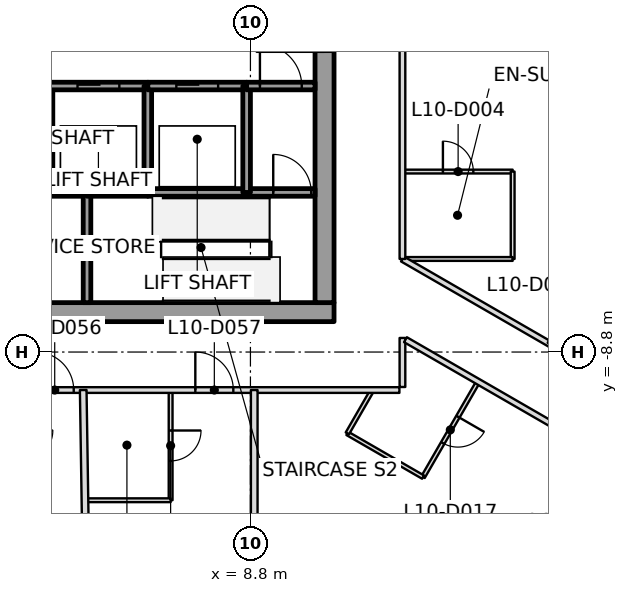
"""IFC4 building model, lengths in metres.
Left out: names, types, materials, properties, quantities, classifications, styles, units other than length and angle.
Written with IfcOpenShell. Run it as: python <this file> out.ifc"""

import sys

from ifc_helpers import new_model, si_unit, direction, frame, frame_2d, origin, place, context, subcontext, project, spatial, rectangle, extrude, element, fill, save


model = new_model("IFC4")
c1 = context("Model", 3, precision=1e-05, world=origin(), true_north=direction((0.0, 1.0)))
c2 = subcontext(c1, "Body", "Model", "MODEL_VIEW")
j1 = project(units=[si_unit("LENGTHUNIT", "METRE"), si_unit("PLANEANGLEUNIT", "RADIAN")], contexts=[c1])
p1 = place(None, origin())
s1 = spatial("IfcSite", under=j1, at=p1, CompositionType="ELEMENT")
p2 = place(p1, origin())
s2 = spatial("IfcBuilding", under=s1, at=p2, CompositionType="ELEMENT")
p3 = place(p2, frame((0.0, 0.0, 59.1)))
s3 = spatial("IfcBuildingStorey", under=s2, at=p3, CompositionType="ELEMENT", Elevation=59.1)
p4 = place(p3, frame((-11.0, -7.75, 0.0), z_axis=(0.0, 0.0, 1.0), x_axis=(1.0, 0.0, 0.0)))
e1 = element("IfcWall", 1, at=p4, inside=s3, PredefinedType="SHEAR", context=c2, shape_type="SweptSolid", body=[
    extrude(rectangle(XDim=22.0, YDim=0.5, at=frame_2d((11.0, 0.0))), origin(), (0.0, 0.0, 1.0), 3.7),
])
p5 = place(p4, frame((10.45, 0.0, 0.0)))
e2 = element("IfcOpeningElement", 2, at=p5, cuts=e1, PredefinedType="OPENING", context=c2, shape_type="SweptSolid", body=[
    extrude(rectangle(XDim=1.1, YDim=2.1, at=frame_2d((0.55, 1.05))), frame((0.0, 0.25, 0.0), z_axis=(0.0, -1.0, 0.0), x_axis=(1.0, 0.0, 0.0)), (0.0, 0.0, 1.0), 0.5),
])
p6 = place(p3, frame((10.75, -7.5, 0.0), z_axis=(0.0, 0.0, 1.0), x_axis=(0.0, 1.0, 0.0)))
e3 = element("IfcWall", 3, at=p6, inside=s3, PredefinedType="SHEAR", context=c2, shape_type="SweptSolid", body=[
    extrude(rectangle(XDim=15.0, YDim=0.5, at=frame_2d((7.5, 0.0))), origin(), (0.0, 0.0, 1.0), 3.7),
])
p7 = place(p6, frame((6.6, 0.0, 0.0)))
e4 = element("IfcOpeningElement", 4, at=p7, cuts=e3, PredefinedType="OPENING", context=c2, shape_type="SweptSolid", body=[
    extrude(rectangle(XDim=1.8, YDim=2.1, at=frame_2d((0.9, 1.05))), frame((0.0, 0.25, 0.0), z_axis=(0.0, -1.0, 0.0), x_axis=(1.0, 0.0, 0.0)), (0.0, 0.0, 1.0), 0.5),
])
p8 = place(p3, frame((4.5, -4.6, 0.0), z_axis=(0.0, 0.0, 1.0), x_axis=(-1.0, 0.0, 0.0)))
e5 = element("IfcWall", 5, at=p8, inside=s3, PredefinedType="SOLIDWALL", context=c2, shape_type="SweptSolid", body=[
    extrude(rectangle(XDim=1.0, YDim=0.2, at=frame_2d((0.5, 0.0))), origin(), (0.0, 0.0, 1.0), 3.55),
])
p9 = place(p3, frame((3.5, -1.8, 0.0), z_axis=(0.0, 0.0, 1.0), x_axis=(1.0, 0.0, 0.0)))
e6 = element("IfcWall", 6, at=p9, inside=s3, PredefinedType="SOLIDWALL", context=c2, shape_type="SweptSolid", body=[
    extrude(rectangle(XDim=2.6, YDim=0.2, at=frame_2d((1.3, 0.0))), origin(), (0.0, 0.0, 1.0), 3.55),
])
p10 = place(p9, frame((0.75, 0.0, 0.0)))
e7 = element("IfcOpeningElement", 7, at=p10, cuts=e6, PredefinedType="OPENING", context=c2, shape_type="SweptSolid", body=[
    extrude(rectangle(XDim=1.1, YDim=2.1, at=frame_2d((0.55, 1.05))), frame((0.0, 0.1, 0.0), z_axis=(0.0, -1.0, 0.0), x_axis=(1.0, 0.0, 0.0)), (0.0, 0.0, 1.0), 0.2),
])
p11 = place(p3, frame((4.5, -7.5, 0.0), z_axis=(0.0, 0.0, 1.0), x_axis=(0.0, 1.0, 0.0)))
e8 = element("IfcWall", 8, at=p11, inside=s3, PredefinedType="SOLIDWALL", context=c2, shape_type="SweptSolid", body=[
    extrude(rectangle(XDim=2.9, YDim=0.2, at=frame_2d((1.45, 0.0))), origin(), (0.0, 0.0, 1.0), 3.55),
])
p12 = place(p3, frame((4.5, -4.6, 0.0), z_axis=(0.0, 0.0, 1.0), x_axis=(1.0, 0.0, 0.0)))
e9 = element("IfcWall", 9, at=p12, inside=s3, PredefinedType="SOLIDWALL", context=c2, shape_type="SweptSolid", body=[
    extrude(rectangle(XDim=1.6, YDim=0.2, at=frame_2d((0.8, 0.0))), origin(), (0.0, 0.0, 1.0), 3.55),
])
p13 = place(p3, frame((6.1, -4.6, 0.0), z_axis=(0.0, 0.0, 1.0), x_axis=(1.0, 0.0, 0.0)))
e10 = element("IfcWall", 10, at=p13, inside=s3, PredefinedType="SOLIDWALL", context=c2, shape_type="SweptSolid", body=[
    extrude(rectangle(XDim=2.6, YDim=0.2, at=frame_2d((1.3, 0.0))), origin(), (0.0, 0.0, 1.0), 3.55),
])
p14 = place(p3, frame((6.1, -4.6, 0.0), z_axis=(0.0, 0.0, 1.0), x_axis=(0.0, 1.0, 0.0)))
e11 = element("IfcWall", 11, at=p14, inside=s3, PredefinedType="SOLIDWALL", context=c2, shape_type="SweptSolid", body=[
    extrude(rectangle(XDim=2.8, YDim=0.2, at=frame_2d((1.4, 0.0))), origin(), (0.0, 0.0, 1.0), 3.55),
])
p15 = place(p3, frame((6.1, -1.8, 0.0), z_axis=(0.0, 0.0, 1.0), x_axis=(1.0, 0.0, 0.0)))
e12 = element("IfcWall", 12, at=p15, inside=s3, PredefinedType="SOLIDWALL", context=c2, shape_type="SweptSolid", body=[
    extrude(rectangle(XDim=2.6, YDim=0.2, at=frame_2d((1.3, 0.0))), origin(), (0.0, 0.0, 1.0), 3.55),
])
p16 = place(p15, frame((0.75, 0.0, 0.0)))
e13 = element("IfcOpeningElement", 13, at=p16, cuts=e12, PredefinedType="OPENING", context=c2, shape_type="SweptSolid", body=[
    extrude(rectangle(XDim=1.1, YDim=2.1, at=frame_2d((0.55, 1.05))), frame((0.0, 0.1, 0.0), z_axis=(0.0, -1.0, 0.0), x_axis=(1.0, 0.0, 0.0)), (0.0, 0.0, 1.0), 0.2),
])
p17 = place(p3, frame((8.7, -4.6, 0.0), z_axis=(0.0, 0.0, 1.0), x_axis=(1.0, 0.0, 0.0)))
e14 = element("IfcWall", 14, at=p17, inside=s3, PredefinedType="SOLIDWALL", context=c2, shape_type="SweptSolid", body=[
    extrude(rectangle(XDim=1.8, YDim=0.2, at=frame_2d((0.9, 0.0))), origin(), (0.0, 0.0, 1.0), 3.55),
])
p18 = place(p17, frame((0.7, 0.0, 0.0)))
e15 = element("IfcOpeningElement", 15, at=p18, cuts=e14, PredefinedType="OPENING", context=c2, shape_type="SweptSolid", body=[
    extrude(rectangle(XDim=1.0, YDim=2.1, at=frame_2d((0.5, 1.05))), frame((0.0, 0.1, 0.0), z_axis=(0.0, -1.0, 0.0), x_axis=(1.0, 0.0, 0.0)), (0.0, 0.0, 1.0), 0.2),
])
p19 = place(p3, frame((8.7, -1.8, 0.0), z_axis=(0.0, 0.0, 1.0), x_axis=(0.0, -1.0, 0.0)))
e16 = element("IfcWall", 16, at=p19, inside=s3, PredefinedType="SOLIDWALL", context=c2, shape_type="SweptSolid", body=[
    extrude(rectangle(XDim=2.8, YDim=0.2, at=frame_2d((1.4, 0.0))), origin(), (0.0, 0.0, 1.0), 3.55),
])
p20 = place(p3, frame((8.7, -1.8, 0.0), z_axis=(0.0, 0.0, 1.0), x_axis=(1.0, 0.0, 0.0)))
e17 = element("IfcWall", 17, at=p20, inside=s3, PredefinedType="SOLIDWALL", context=c2, shape_type="SweptSolid", body=[
    extrude(rectangle(XDim=1.8, YDim=0.2, at=frame_2d((0.9, 0.0))), origin(), (0.0, 0.0, 1.0), 3.55),
])
p21 = place(p20, frame((0.35, 0.0, 0.0)))
e18 = element("IfcOpeningElement", 18, at=p21, cuts=e17, PredefinedType="OPENING", context=c2, shape_type="SweptSolid", body=[
    extrude(rectangle(XDim=1.1, YDim=2.1, at=frame_2d((0.55, 1.05))), frame((0.0, 0.1, 0.0), z_axis=(0.0, -1.0, 0.0), x_axis=(1.0, 0.0, 0.0)), (0.0, 0.0, 1.0), 0.2),
])
p22 = place(p3, frame((4.4, -9.8, 0.0), z_axis=(0.0, 0.0, 1.0), x_axis=(0.015658866924, -0.999877392427, 0.0)))
e19 = element("IfcWall", 19, at=p22, inside=s3, PredefinedType="PARTITIONING", context=c2, shape_type="SweptSolid", body=[
    extrude(rectangle(XDim=16.417, YDim=0.175, at=frame_2d((8.209, 0.0))), origin(), (0.0, 0.0, 1.0), 2.934),
])
p23 = place(p3, frame((8.9, -9.8, 0.0), z_axis=(0.0, 0.0, 1.0), x_axis=(0.0, -1.0, 0.0)))
e20 = element("IfcWall", 20, at=p23, inside=s3, PredefinedType="PARTITIONING", context=c2, shape_type="SweptSolid", body=[
    extrude(rectangle(XDim=16.409, YDim=0.175, at=frame_2d((8.205, 0.0))), origin(), (0.0, 0.0, 1.0), 3.15),
])
p24 = place(p3, frame((19.87, -12.511, 0.0), z_axis=(0.0, 0.0, 1.0), x_axis=(-0.500001430823, -0.866024577697, 0.0)))
e21 = element("IfcWall", 21, at=p24, inside=s3, PredefinedType="PARTITIONING", context=c2, shape_type="SweptSolid", body=[
    extrude(rectangle(XDim=14.141, YDim=0.175, at=frame_2d((7.07, 0.0))), origin(), (0.0, 0.0, 1.0), 2.797),
])
p25 = place(p3, frame((24.011, 3.761, 0.0), z_axis=(0.0, 0.0, 1.0), x_axis=(-0.509232005263, -0.860629284196, 0.0)))
e22 = element("IfcWall", 22, at=p25, inside=s3, PredefinedType="PARTITIONING", context=c2, shape_type="SweptSolid", body=[
    extrude(rectangle(XDim=14.364, YDim=0.175, at=frame_2d((7.182, 0.0))), origin(), (0.0, 0.0, 1.0), 2.947),
])
p26 = place(p3, frame((-12.72, -9.8, 0.0), z_axis=(0.0, 0.0, 1.0), x_axis=(1.0, 0.0, 0.0)))
e23 = element("IfcWall", 23, at=p26, inside=s3, PredefinedType="PARTITIONING", context=c2, shape_type="SweptSolid", body=[
    extrude(rectangle(XDim=25.44, YDim=0.15, at=frame_2d((12.72, 0.0))), origin(), (0.0, 0.0, 1.0), 2.947),
])
p27 = place(p26, frame((3.07, 0.0, 0.0)))
e24 = element("IfcOpeningElement", 24, at=p27, cuts=e23, PredefinedType="OPENING", context=c2, shape_type="SweptSolid", body=[
    extrude(rectangle(XDim=1.0, YDim=2.1, at=frame_2d((0.5, 1.05))), frame((0.0, 0.075, 0.0), z_axis=(0.0, -1.0, 0.0), x_axis=(1.0, 0.0, 0.0)), (0.0, 0.0, 1.0), 0.15),
])
p28 = place(p26, frame((7.47, 0.0, 0.0)))
e25 = element("IfcOpeningElement", 25, at=p28, cuts=e23, PredefinedType="OPENING", context=c2, shape_type="SweptSolid", body=[
    extrude(rectangle(XDim=1.0, YDim=2.1, at=frame_2d((0.5, 1.05))), frame((0.0, 0.075, 0.0), z_axis=(0.0, -1.0, 0.0), x_axis=(1.0, 0.0, 0.0)), (0.0, 0.0, 1.0), 0.15),
])
p29 = place(p26, frame((11.67, 0.0, 0.0)))
e26 = element("IfcOpeningElement", 26, at=p29, cuts=e23, PredefinedType="OPENING", context=c2, shape_type="SweptSolid", body=[
    extrude(rectangle(XDim=1.0, YDim=2.1, at=frame_2d((0.5, 1.05))), frame((0.0, 0.075, 0.0), z_axis=(0.0, -1.0, 0.0), x_axis=(1.0, 0.0, 0.0)), (0.0, 0.0, 1.0), 0.15),
])
p30 = place(p26, frame((15.87, 0.0, 0.0)))
e27 = element("IfcOpeningElement", 27, at=p30, cuts=e23, PredefinedType="OPENING", context=c2, shape_type="SweptSolid", body=[
    extrude(rectangle(XDim=1.0, YDim=2.1, at=frame_2d((0.5, 1.05))), frame((0.0, 0.075, 0.0), z_axis=(0.0, -1.0, 0.0), x_axis=(1.0, 0.0, 0.0)), (0.0, 0.0, 1.0), 0.15),
])
p31 = place(p26, frame((20.07, 0.0, 0.0)))
e28 = element("IfcOpeningElement", 28, at=p31, cuts=e23, PredefinedType="OPENING", context=c2, shape_type="SweptSolid", body=[
    extrude(rectangle(XDim=1.0, YDim=2.1, at=frame_2d((0.5, 1.05))), frame((0.0, 0.075, 0.0), z_axis=(0.0, -1.0, 0.0), x_axis=(1.0, 0.0, 0.0)), (0.0, 0.0, 1.0), 0.15),
])
p32 = place(p3, frame((12.8, -9.72, 0.0), z_axis=(0.0, 0.0, 1.0), x_axis=(0.0, 1.0, 0.0)))
e29 = element("IfcWall", 29, at=p32, inside=s3, PredefinedType="PARTITIONING", context=c2, shape_type="SweptSolid", body=[
    extrude(rectangle(XDim=1.291, YDim=0.15, at=frame_2d((0.646, 0.0))), origin(), (0.0, 0.0, 1.0), 2.797),
])
p33 = place(p3, frame((12.879, -8.475, 0.0), z_axis=(0.0, 0.0, 1.0), x_axis=(0.866021146684, -0.500007373442, 0.0)))
e30 = element("IfcWall", 30, at=p33, inside=s3, PredefinedType="PARTITIONING", context=c2, shape_type="SweptSolid", body=[
    extrude(rectangle(XDim=11.892, YDim=0.15, at=frame_2d((5.946, 0.0))), origin(), (0.0, 0.0, 1.0), 2.797),
])
p34 = place(p33, frame((4.69, 0.0, 0.0)))
e31 = element("IfcOpeningElement", 31, at=p34, cuts=e30, PredefinedType="OPENING", context=c2, shape_type="SweptSolid", body=[
    extrude(rectangle(XDim=1.0, YDim=2.1, at=frame_2d((0.5, 1.05))), frame((0.0, 0.075, 0.0), z_axis=(0.0, -1.0, 0.0), x_axis=(1.0, 0.0, 0.0)), (0.0, 0.0, 1.0), 0.15),
])
p35 = place(p33, frame((10.723, 0.0, 0.0)))
e32 = element("IfcOpeningElement", 32, at=p35, cuts=e30, PredefinedType="OPENING", context=c2, shape_type="SweptSolid", body=[
    extrude(rectangle(XDim=1.0, YDim=2.1, at=frame_2d((0.5, 1.05))), frame((0.0, 0.075, 0.0), z_axis=(0.0, -1.0, 0.0), x_axis=(1.0, 0.0, 0.0)), (0.0, 0.0, 1.0), 0.15),
])
p36 = place(p3, frame((24.079, -12.863, 0.0), z_axis=(0.0, 0.0, 1.0), x_axis=(-0.866024189303, 0.500002103537, 0.0)))
e33 = element("IfcWall", 33, at=p36, inside=s3, PredefinedType="PARTITIONING", context=c2, shape_type="SweptSolid", body=[
    extrude(rectangle(XDim=13.023, YDim=0.15, at=frame_2d((6.512, 0.0))), origin(), (0.0, 0.0, 1.0), 2.947),
])
p37 = place(p36, frame((1.771, 0.0, 0.0)))
e34 = element("IfcOpeningElement", 34, at=p37, cuts=e33, PredefinedType="OPENING", context=c2, shape_type="SweptSolid", body=[
    extrude(rectangle(XDim=1.0, YDim=2.1, at=frame_2d((0.5, 1.05))), frame((0.0, 0.075, 0.0), z_axis=(0.0, -1.0, 0.0), x_axis=(1.0, 0.0, 0.0)), (0.0, 0.0, 1.0), 0.15),
])
p38 = place(p36, frame((7.273, 0.0, 0.0)))
e35 = element("IfcOpeningElement", 35, at=p38, cuts=e33, PredefinedType="OPENING", context=c2, shape_type="SweptSolid", body=[
    extrude(rectangle(XDim=1.0, YDim=2.1, at=frame_2d((0.5, 1.05))), frame((0.0, 0.075, 0.0), z_axis=(0.0, -1.0, 0.0), x_axis=(1.0, 0.0, 0.0)), (0.0, 0.0, 1.0), 0.15),
])
p39 = place(p3, frame((12.8, -6.351, 0.0), z_axis=(0.0, 0.0, 1.0), x_axis=(0.0, 1.0, 0.0)))
e36 = element("IfcWall", 36, at=p39, inside=s3, PredefinedType="PARTITIONING", context=c2, shape_type="SweptSolid", body=[
    extrude(rectangle(XDim=16.071, YDim=0.15, at=frame_2d((8.035, 0.0))), origin(), (0.0, 0.0, 1.0), 3.017),
])
p40 = place(p39, frame((6.825, 0.0, 0.0)))
e37 = element("IfcOpeningElement", 37, at=p40, cuts=e36, PredefinedType="OPENING", context=c2, shape_type="SweptSolid", body=[
    extrude(rectangle(XDim=1.0, YDim=2.1, at=frame_2d((0.5, 1.05))), frame((0.0, 0.075, 0.0), z_axis=(0.0, -1.0, 0.0), x_axis=(1.0, 0.0, 0.0)), (0.0, 0.0, 1.0), 0.15),
])
p41 = place(p39, frame((13.701, 0.0, 0.0)))
e38 = element("IfcOpeningElement", 38, at=p41, cuts=e36, PredefinedType="OPENING", context=c2, shape_type="SweptSolid", body=[
    extrude(rectangle(XDim=1.0, YDim=2.1, at=frame_2d((0.5, 1.05))), frame((0.0, 0.075, 0.0), z_axis=(0.0, -1.0, 0.0), x_axis=(1.0, 0.0, 0.0)), (0.0, 0.0, 1.0), 0.15),
])
p42 = place(p3, frame((6.7, -9.83, 0.0), z_axis=(0.0, 0.0, 1.0), x_axis=(0.0, -1.0, 0.0)))
e39 = element("IfcWall", 39, at=p42, inside=s3, PredefinedType="PARTITIONING", context=c2, shape_type="SweptSolid", body=[
    extrude(rectangle(XDim=2.87, YDim=0.1, at=frame_2d((1.435, 0.0))), origin(), (0.0, 0.0, 1.0), 3.15),
])
p43 = place(p42, frame((1.035, 0.0, 0.0)))
e40 = element("IfcOpeningElement", 40, at=p43, cuts=e39, PredefinedType="OPENING", context=c2, shape_type="SweptSolid", body=[
    extrude(rectangle(XDim=0.8, YDim=2.1, at=frame_2d((0.4, 1.05))), frame((0.0, 0.05, 0.0), z_axis=(0.0, -1.0, 0.0), x_axis=(1.0, 0.0, 0.0)), (0.0, 0.0, 1.0), 0.1),
])
p44 = place(p3, frame((6.7, -12.7, 0.0), z_axis=(0.0, 0.0, 1.0), x_axis=(-1.0, 0.0, 0.0)))
e41 = element("IfcWall", 41, at=p44, inside=s3, PredefinedType="PARTITIONING", context=c2, shape_type="SweptSolid", body=[
    extrude(rectangle(XDim=2.27, YDim=0.1, at=frame_2d((1.135, 0.0))), origin(), (0.0, 0.0, 1.0), 2.947),
])
p45 = place(p3, frame((14.777, -9.605, 0.0), z_axis=(0.0, 0.0, 1.0), x_axis=(-0.499999802827, -0.866025517622, 0.0)))
e42 = element("IfcWall", 42, at=p45, inside=s3, PredefinedType="PARTITIONING", context=c2, shape_type="SweptSolid", body=[
    extrude(rectangle(XDim=2.87, YDim=0.1, at=frame_2d((1.435, 0.0))), origin(), (0.0, 0.0, 1.0), 2.797),
])
p46 = place(p45, frame((1.035, 0.0, 0.0)))
e43 = element("IfcOpeningElement", 43, at=p46, cuts=e42, PredefinedType="OPENING", context=c2, shape_type="SweptSolid", body=[
    extrude(rectangle(XDim=0.8, YDim=2.1, at=frame_2d((0.4, 1.05))), frame((0.0, 0.05, 0.0), z_axis=(0.0, -1.0, 0.0), x_axis=(1.0, 0.0, 0.0)), (0.0, 0.0, 1.0), 0.1),
])
p47 = place(p3, frame((13.342, -12.091, 0.0), z_axis=(0.0, 0.0, 1.0), x_axis=(-0.86602648383, 0.499998129301, 0.0)))
e44 = element("IfcWall", 44, at=p47, inside=s3, PredefinedType="PARTITIONING", context=c2, shape_type="SweptSolid", body=[
    extrude(rectangle(XDim=2.3, YDim=0.1, at=frame_2d((1.15, 0.0))), origin(), (0.0, 0.0, 1.0), 2.947),
])
p48 = place(p3, frame((11.35, -10.941, 0.0), z_axis=(0.0, 0.0, 1.0), x_axis=(0.499865263774, 0.866103179807, 0.0)))
e45 = element("IfcWall", 45, at=p48, inside=s3, PredefinedType="PARTITIONING", context=c2, shape_type="SweptSolid", body=[
    extrude(rectangle(XDim=1.282, YDim=0.1, at=frame_2d((0.641, 0.0))), origin(), (0.0, 0.0, 1.0), 3.15),
])
p49 = place(p3, frame((12.83, -4.051, 0.0), z_axis=(0.0, 0.0, 1.0), x_axis=(1.0, 0.0, 0.0)))
e46 = element("IfcWall", 46, at=p49, inside=s3, PredefinedType="PARTITIONING", context=c2, shape_type="SweptSolid", body=[
    extrude(rectangle(XDim=2.87, YDim=0.1, at=frame_2d((1.435, 0.0))), origin(), (0.0, 0.0, 1.0), 3.15),
])
p50 = place(p49, frame((1.035, 0.0, 0.0)))
e47 = element("IfcOpeningElement", 47, at=p50, cuts=e46, PredefinedType="OPENING", context=c2, shape_type="SweptSolid", body=[
    extrude(rectangle(XDim=0.8, YDim=2.1, at=frame_2d((0.4, 1.05))), frame((0.0, 0.05, 0.0), z_axis=(0.0, -1.0, 0.0), x_axis=(1.0, 0.0, 0.0)), (0.0, 0.0, 1.0), 0.1),
])
p51 = place(p3, frame((15.7, -4.051, 0.0), z_axis=(0.0, 0.0, 1.0), x_axis=(0.0, -1.0, 0.0)))
e48 = element("IfcWall", 48, at=p51, inside=s3, PredefinedType="PARTITIONING", context=c2, shape_type="SweptSolid", body=[
    extrude(rectangle(XDim=2.3, YDim=0.1, at=frame_2d((1.15, 0.0))), origin(), (0.0, 0.0, 1.0), 2.947),
])
p52 = place(p3, frame((15.7, -6.351, 0.0), z_axis=(0.0, 0.0, 1.0), x_axis=(-1.0, 0.0, 0.0)))
e49 = element("IfcWall", 49, at=p52, inside=s3, PredefinedType="PARTITIONING", context=c2, shape_type="SweptSolid", body=[
    extrude(rectangle(XDim=2.84, YDim=0.1, at=frame_2d((1.42, 0.0))), origin(), (0.0, 0.0, 1.0), 2.947),
])
p53 = place(p50, origin())
e50 = element("IfcDoor", 50, at=p53, inside=s3, OperationType="SINGLE_SWING_LEFT", PredefinedType="DOOR", context=c2, shape_type="SweptSolid", body=[
    extrude(rectangle(XDim=0.8, YDim=2.1, at=frame_2d((0.4, 1.05))), frame((0.0, 0.025, 0.0), z_axis=(0.0, -1.0, 0.0), x_axis=(1.0, 0.0, 0.0)), (0.0, 0.0, 1.0), 0.05),
])
fill(e47, e50)
p54 = place(p30, origin())
e51 = element("IfcDoor", 51, at=p54, inside=s3, OperationType="SINGLE_SWING_LEFT", PredefinedType="DOOR", context=c2, shape_type="SweptSolid", body=[
    extrude(rectangle(XDim=1.0, YDim=2.1, at=frame_2d((0.5, 1.05))), frame((0.0, 0.025, 0.0), z_axis=(0.0, -1.0, 0.0), x_axis=(1.0, 0.0, 0.0)), (0.0, 0.0, 1.0), 0.05),
])
fill(e27, e51)
p55 = place(p31, origin())
e52 = element("IfcDoor", 52, at=p55, inside=s3, OperationType="SINGLE_SWING_LEFT", PredefinedType="DOOR", context=c2, shape_type="SweptSolid", body=[
    extrude(rectangle(XDim=1.0, YDim=2.1, at=frame_2d((0.5, 1.05))), frame((0.0, 0.025, 0.0), z_axis=(0.0, -1.0, 0.0), x_axis=(1.0, 0.0, 0.0)), (0.0, 0.0, 1.0), 0.05),
])
fill(e28, e52)
p56 = place(p43, origin())
e53 = element("IfcDoor", 53, at=p56, inside=s3, OperationType="SINGLE_SWING_LEFT", PredefinedType="DOOR", context=c2, shape_type="SweptSolid", body=[
    extrude(rectangle(XDim=0.8, YDim=2.1, at=frame_2d((0.4, 1.05))), frame((0.0, 0.025, 0.0), z_axis=(0.0, -1.0, 0.0), x_axis=(1.0, 0.0, 0.0)), (0.0, 0.0, 1.0), 0.05),
])
fill(e40, e53)
p57 = place(p46, origin())
e54 = element("IfcDoor", 54, at=p57, inside=s3, OperationType="SINGLE_SWING_LEFT", PredefinedType="DOOR", context=c2, shape_type="SweptSolid", body=[
    extrude(rectangle(XDim=0.8, YDim=2.1, at=frame_2d((0.4, 1.05))), frame((0.0, 0.025, 0.0), z_axis=(0.0, -1.0, 0.0), x_axis=(1.0, 0.0, 0.0)), (0.0, 0.0, 1.0), 0.05),
])
fill(e43, e54)
p58 = place(p10, origin())
e55 = element("IfcDoor", 55, at=p58, inside=s3, OperationType="SLIDING_TO_LEFT", PredefinedType="DOOR", context=c2, shape_type="SweptSolid", body=[
    extrude(rectangle(XDim=1.1, YDim=2.1, at=frame_2d((0.55, 1.05))), frame((0.0, 0.025, 0.0), z_axis=(0.0, -1.0, 0.0), x_axis=(1.0, 0.0, 0.0)), (0.0, 0.0, 1.0), 0.05),
])
fill(e7, e55)
p59 = place(p16, origin())
e56 = element("IfcDoor", 56, at=p59, inside=s3, OperationType="SLIDING_TO_LEFT", PredefinedType="DOOR", context=c2, shape_type="SweptSolid", body=[
    extrude(rectangle(XDim=1.1, YDim=2.1, at=frame_2d((0.55, 1.05))), frame((0.0, 0.025, 0.0), z_axis=(0.0, -1.0, 0.0), x_axis=(1.0, 0.0, 0.0)), (0.0, 0.0, 1.0), 0.05),
])
fill(e13, e56)
p60 = place(p21, origin())
e57 = element("IfcDoor", 57, at=p60, inside=s3, OperationType="SINGLE_SWING_RIGHT", PredefinedType="DOOR", context=c2, shape_type="SweptSolid", body=[
    extrude(rectangle(XDim=1.1, YDim=2.1, at=frame_2d((0.55, 1.05))), frame((0.0, 0.025, 0.0), z_axis=(0.0, -1.0, 0.0), x_axis=(1.0, 0.0, 0.0)), (0.0, 0.0, 1.0), 0.05),
])
fill(e18, e57)
p61 = place(p18, origin())
e58 = element("IfcDoor", 58, at=p61, inside=s3, OperationType="SINGLE_SWING_RIGHT", PredefinedType="DOOR", context=c2, shape_type="SweptSolid", body=[
    extrude(rectangle(XDim=1.0, YDim=2.1, at=frame_2d((0.5, 1.05))), frame((0.0, 0.025, 0.0), z_axis=(0.0, -1.0, 0.0), x_axis=(1.0, 0.0, 0.0)), (0.0, 0.0, 1.0), 0.05),
])
fill(e15, e58)
p62 = place(p7, origin())
e59 = element("IfcDoor", 59, at=p62, inside=s3, OperationType="DOUBLE_DOOR_SINGLE_SWING", PredefinedType="DOOR", context=c2, shape_type="SweptSolid", body=[
    extrude(rectangle(XDim=1.8, YDim=2.1, at=frame_2d((0.9, 1.05))), frame((0.0, 0.025, 0.0), z_axis=(0.0, -1.0, 0.0), x_axis=(1.0, 0.0, 0.0)), (0.0, 0.0, 1.0), 0.05),
])
fill(e4, e59)
save(model, sys.argv[1])
